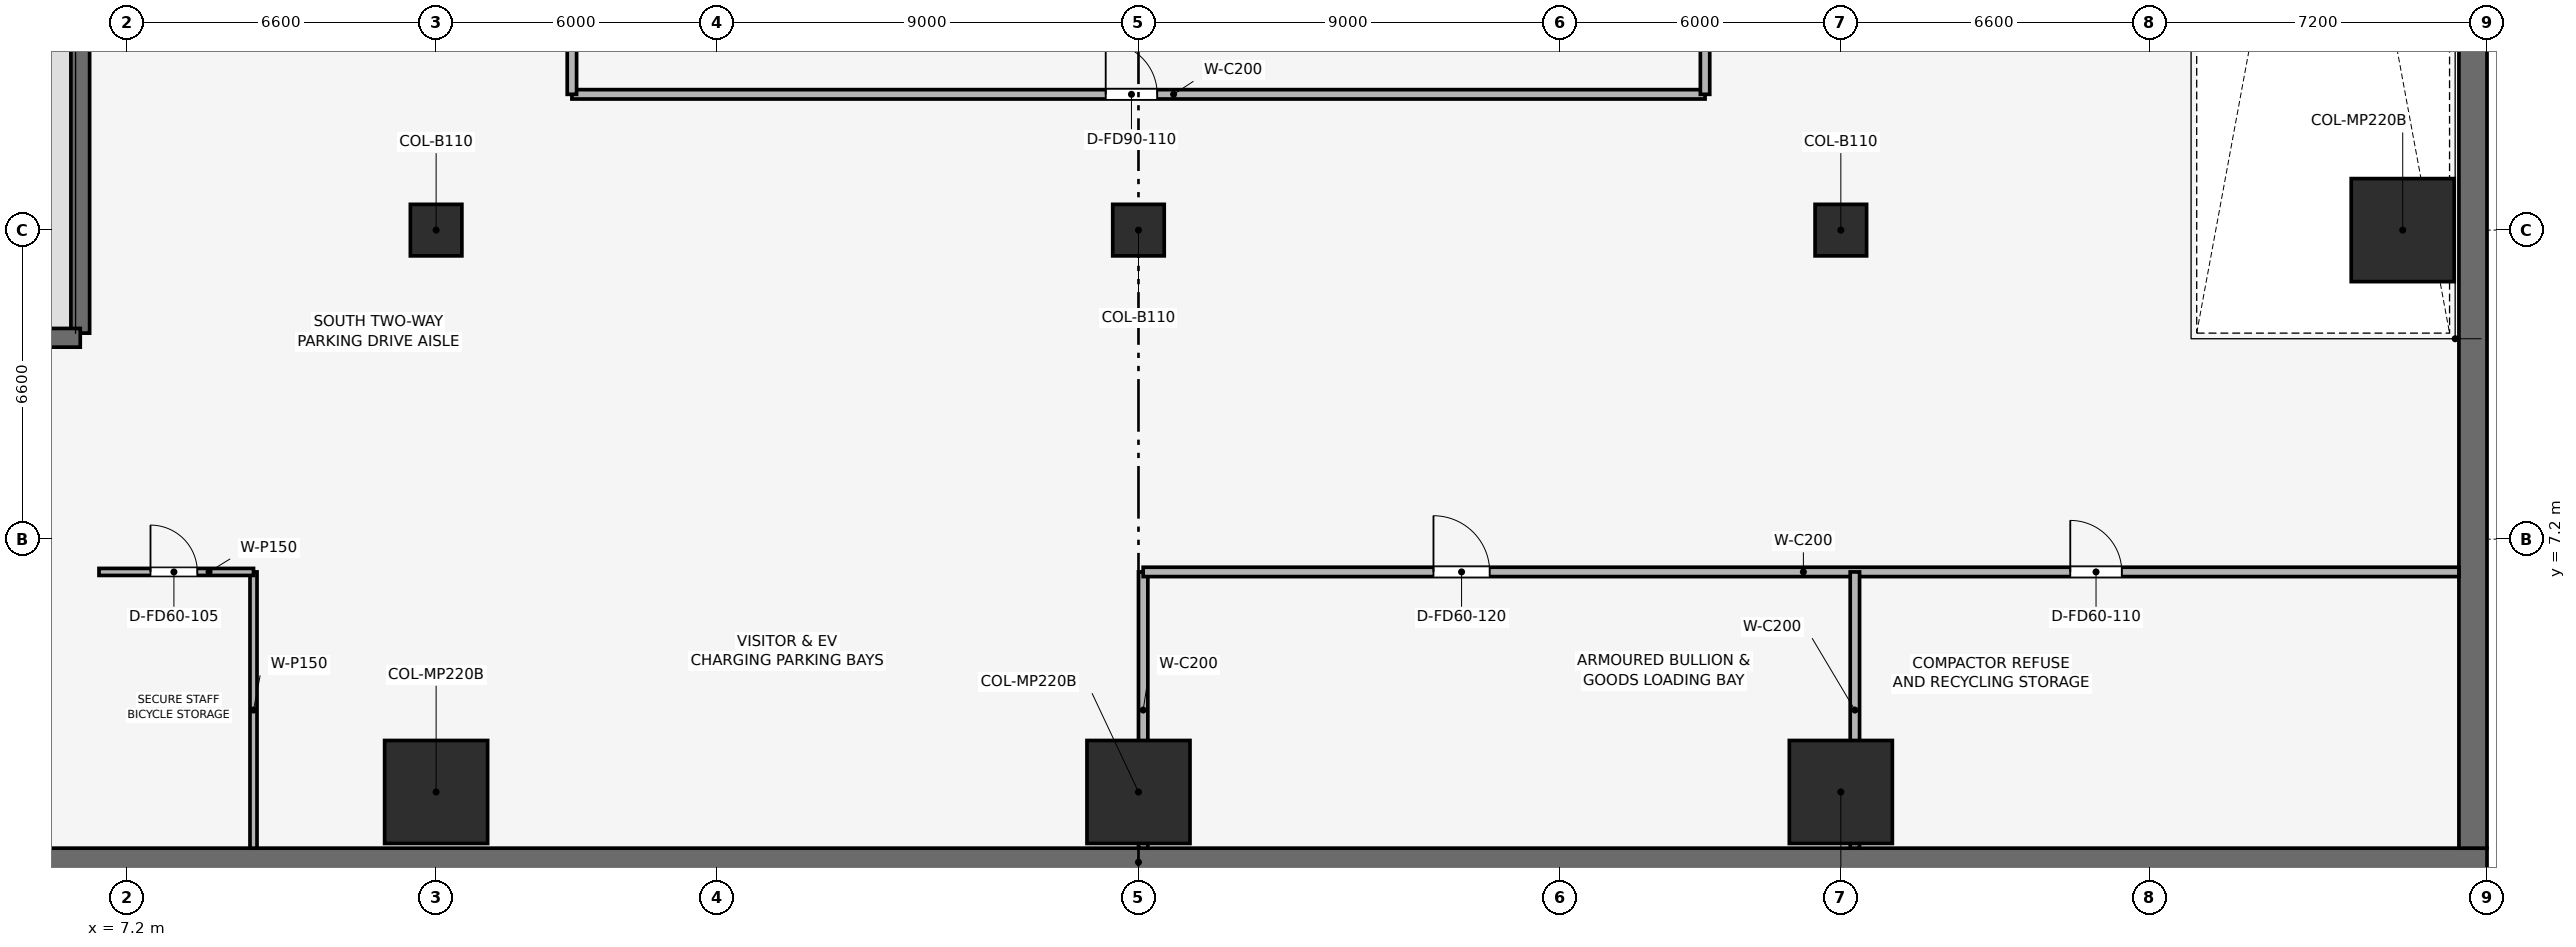
"""IFC4 building model, lengths in metres.
Left out: names, types, materials, properties, quantities, classifications, styles, units other than length and angle.
Written with IfcOpenShell. Run it as: python <this file> out.ifc"""

import sys

from ifc_helpers import new_model, si_unit, direction, frame, frame_2d, origin, origin_2d, place, context, subcontext, project, spatial, rectangle, extrude, element, fill, save


model = new_model("IFC4")
c1 = context("Model", 3, precision=1e-05, world=origin(), true_north=direction((0.0, 1.0)))
c2 = subcontext(c1, "Body", "Model", "MODEL_VIEW")
j1 = project(units=[si_unit("LENGTHUNIT", "METRE"), si_unit("PLANEANGLEUNIT", "RADIAN")], contexts=[c1])
p1 = place(None, origin())
s1 = spatial("IfcSite", under=j1, at=p1, CompositionType="ELEMENT")
p2 = place(p1, origin())
s2 = spatial("IfcBuilding", under=s1, at=p2, CompositionType="ELEMENT")
p3 = place(p2, frame((0.0, 0.0, -4.8)))
s3 = spatial("IfcBuildingStorey", under=s2, at=p3, CompositionType="ELEMENT", Elevation=-4.8)
p4 = place(p3, frame((0.0, 0.3, 0.0), z_axis=(0.0, 0.0, 1.0), x_axis=(1.0, 0.0, 0.0)))
e1 = element("IfcWall", 1, at=p4, inside=s3, PredefinedType="SOLIDWALL", context=c2, shape_type="SweptSolid", body=[
    extrude(rectangle(XDim=57.6, YDim=0.6, at=frame_2d((28.8, 0.0))), origin(), (0.0, 0.0, 1.0), 4.8),
])
p5 = place(p3, frame((57.3, 0.6, 0.0), z_axis=(0.0, 0.0, 1.0), x_axis=(0.0, 1.0, 0.0)))
e2 = element("IfcWall", 2, at=p5, inside=s3, PredefinedType="SOLIDWALL", context=c2, shape_type="SweptSolid", body=[
    extrude(rectangle(XDim=56.4, YDim=0.6, at=frame_2d((28.2, 0.0))), origin(), (0.0, 0.0, 1.0), 4.8),
])
for number, where, z_axis, x_axis in (
    (3, (13.8, 1.8, 0.002), (0.0, 0.0, 1.0), (1.0, 0.0, 0.0)),
    (4, (28.8, 1.8, 0.002), (0.0, 0.0, 1.0), (1.0, 0.0, 0.0)),
    (5, (43.8, 1.8, 0.002), (0.0, 0.0, 1.0), (1.0, 0.0, 0.0)),
    (6, (55.8, 13.8, 0.002), (0.0, 0.0, 1.0), (1.0, 0.0, 0.0)),
):
    element("IfcColumn", number, at=place(p3, frame(where, z_axis=z_axis, x_axis=x_axis)), inside=s3, PredefinedType="COLUMN", context=c2, shape_type="SweptSolid", body=[
        extrude(rectangle(XDim=2.2, YDim=2.2, at=origin_2d()), origin(), (0.0, 0.0, 1.0), 4.796),
    ])
for number, where, z_axis, x_axis in (
    (7, (13.8, 13.8, 0.002), (0.0, 0.0, 1.0), (1.0, 0.0, 0.0)),
    (8, (28.8, 13.8, 0.002), (0.0, 0.0, 1.0), (1.0, 0.0, 0.0)),
    (9, (43.8, 13.8, 0.002), (0.0, 0.0, 1.0), (1.0, 0.0, 0.0)),
):
    element("IfcColumn", number, at=place(p3, frame(where, z_axis=z_axis, x_axis=x_axis)), inside=s3, PredefinedType="COLUMN", context=c2, shape_type="SweptSolid", body=[
        extrude(rectangle(XDim=1.1, YDim=1.1, at=origin_2d()), origin(), (0.0, 0.0, 1.0), 4.796),
    ])
p6 = place(p3, frame((6.2, 11.6, 0.0), z_axis=(0.0, 0.0, 1.0), x_axis=(0.0, 1.0, 0.0)))
e10 = element("IfcWall", 10, at=p6, inside=s3, PredefinedType="SHEAR", context=c2, shape_type="SweptSolid", body=[
    extrude(rectangle(XDim=29.4, YDim=0.4, at=frame_2d((14.7, 0.0))), origin(), (0.0, 0.0, 1.0), 4.78),
])
p7 = place(p3, frame((0.8, 11.5, 0.0), z_axis=(0.0, 0.0, 1.0), x_axis=(1.0, 0.0, 0.0)))
e11 = element("IfcWall", 11, at=p7, inside=s3, PredefinedType="SHEAR", context=c2, shape_type="SweptSolid", body=[
    extrude(rectangle(XDim=5.4, YDim=0.4, at=frame_2d((2.7, 0.0))), origin(), (0.0, 0.0, 1.0), 4.78),
])
p8 = place(p3, frame((16.7, 16.7, 0.0), z_axis=(0.0, 0.0, 1.0), x_axis=(1.0, 0.0, 0.0)))
e12 = element("IfcWall", 12, at=p8, inside=s3, PredefinedType="PARTITIONING", context=c2, shape_type="SweptSolid", body=[
    extrude(rectangle(XDim=24.2, YDim=0.2, at=frame_2d((12.1, 0.0))), origin(), (0.0, 0.0, 1.0), 2.985),
])
p9 = place(p8, frame((11.4, 0.0, 0.0)))
e13 = element("IfcOpeningElement", 13, at=p9, cuts=e12, PredefinedType="OPENING", context=c2, shape_type="SweptSolid", body=[
    extrude(rectangle(XDim=1.1, YDim=2.15, at=frame_2d((0.55, 1.075))), frame((0.0, 0.11, 0.0), z_axis=(0.0, -1.0, 0.0), x_axis=(1.0, 0.0, 0.0)), (0.0, 0.0, 1.0), 0.22),
])
p10 = place(p3, frame((16.7, 16.7, 0.0), z_axis=(0.0, 0.0, 1.0), x_axis=(0.0, 1.0, 0.0)))
e14 = element("IfcWall", 14, at=p10, inside=s3, PredefinedType="PARTITIONING", context=c2, shape_type="SweptSolid", body=[
    extrude(rectangle(XDim=24.2, YDim=0.2, at=frame_2d((12.1, 0.0))), origin(), (0.0, 0.0, 1.0), 2.985),
])
p11 = place(p10, frame((11.4, 0.0, 0.0)))
e15 = element("IfcOpeningElement", 15, at=p11, cuts=e14, PredefinedType="OPENING", context=c2, shape_type="SweptSolid", body=[
    extrude(rectangle(XDim=1.1, YDim=2.15, at=frame_2d((0.55, 1.075))), frame((0.0, 0.11, 0.0), z_axis=(0.0, -1.0, 0.0), x_axis=(1.0, 0.0, 0.0)), (0.0, 0.0, 1.0), 0.22),
])
p12 = place(p3, frame((40.9, 16.7, 0.0), z_axis=(0.0, 0.0, 1.0), x_axis=(0.0, 1.0, 0.0)))
e16 = element("IfcWall", 16, at=p12, inside=s3, PredefinedType="PARTITIONING", context=c2, shape_type="SweptSolid", body=[
    extrude(rectangle(XDim=24.2, YDim=0.2, at=frame_2d((12.1, 0.0))), origin(), (0.0, 0.0, 1.0), 2.985),
])
p13 = place(p12, frame((11.4, 0.0, 0.0)))
e17 = element("IfcOpeningElement", 17, at=p13, cuts=e16, PredefinedType="OPENING", context=c2, shape_type="SweptSolid", body=[
    extrude(rectangle(XDim=1.1, YDim=2.15, at=frame_2d((0.55, 1.075))), frame((0.0, 0.11, 0.0), z_axis=(0.0, -1.0, 0.0), x_axis=(1.0, 0.0, 0.0)), (0.0, 0.0, 1.0), 0.22),
])
p14 = place(p3, frame((28.9, 0.6, 0.0), z_axis=(0.0, 0.0, 1.0), x_axis=(0.0, 1.0, 0.0)))
e18 = element("IfcWall", 18, at=p14, inside=s3, PredefinedType="PARTITIONING", context=c2, shape_type="SweptSolid", body=[
    extrude(rectangle(XDim=5.9, YDim=0.2, at=frame_2d((2.95, 0.0))), origin(), (0.0, 0.0, 1.0), 4.4),
])
p15 = place(p3, frame((28.9, 6.5, 0.0), z_axis=(0.0, 0.0, 1.0), x_axis=(1.0, 0.0, 0.0)))
e19 = element("IfcWall", 19, at=p15, inside=s3, PredefinedType="PARTITIONING", context=c2, shape_type="SweptSolid", body=[
    extrude(rectangle(XDim=28.1, YDim=0.2, at=frame_2d((14.05, 0.0))), origin(), (0.0, 0.0, 1.0), 4.4),
])
p16 = place(p15, frame((6.2, 0.0, 0.0)))
e20 = element("IfcOpeningElement", 20, at=p16, cuts=e19, PredefinedType="OPENING", context=c2, shape_type="SweptSolid", body=[
    extrude(rectangle(XDim=1.2, YDim=2.2, at=frame_2d((0.6, 1.1))), frame((0.0, 0.11, 0.0), z_axis=(0.0, -1.0, 0.0), x_axis=(1.0, 0.0, 0.0)), (0.0, 0.0, 1.0), 0.22),
])
p17 = place(p15, frame((19.8, 0.0, 0.0)))
e21 = element("IfcOpeningElement", 21, at=p17, cuts=e19, PredefinedType="OPENING", context=c2, shape_type="SweptSolid", body=[
    extrude(rectangle(XDim=1.1, YDim=2.15, at=frame_2d((0.55, 1.075))), frame((0.0, 0.11, 0.0), z_axis=(0.0, -1.0, 0.0), x_axis=(1.0, 0.0, 0.0)), (0.0, 0.0, 1.0), 0.22),
])
p18 = place(p3, frame((44.1, 0.6, 0.0), z_axis=(0.0, 0.0, 1.0), x_axis=(0.0, 1.0, 0.0)))
e22 = element("IfcWall", 22, at=p18, inside=s3, PredefinedType="PARTITIONING", context=c2, shape_type="SweptSolid", body=[
    extrude(rectangle(XDim=5.9, YDim=0.2, at=frame_2d((2.95, 0.0))), origin(), (0.0, 0.0, 1.0), 4.4),
])
p19 = place(p3, frame((9.9, 0.6, 0.0), z_axis=(0.0, 0.0, 1.0), x_axis=(0.0, 1.0, 0.0)))
e23 = element("IfcWall", 23, at=p19, inside=s3, PredefinedType="PARTITIONING", context=c2, shape_type="SweptSolid", body=[
    extrude(rectangle(XDim=5.9, YDim=0.15, at=frame_2d((2.95, 0.0))), origin(), (0.0, 0.0, 1.0), 4.4),
])
p20 = place(p3, frame((6.6, 6.5, 0.0), z_axis=(0.0, 0.0, 1.0), x_axis=(1.0, 0.0, 0.0)))
e24 = element("IfcWall", 24, at=p20, inside=s3, PredefinedType="PARTITIONING", context=c2, shape_type="SweptSolid", body=[
    extrude(rectangle(XDim=3.3, YDim=0.15, at=frame_2d((1.65, 0.0))), origin(), (0.0, 0.0, 1.0), 4.4),
])
p21 = place(p20, frame((1.1, 0.0, 0.0)))
e25 = element("IfcOpeningElement", 25, at=p21, cuts=e24, PredefinedType="OPENING", context=c2, shape_type="SweptSolid", body=[
    extrude(rectangle(XDim=1.0, YDim=2.15, at=frame_2d((0.5, 1.075))), frame((0.0, 0.085, 0.0), z_axis=(0.0, -1.0, 0.0), x_axis=(1.0, 0.0, 0.0)), (0.0, 0.0, 1.0), 0.17),
])
p22 = place(p9, origin())
e26 = element("IfcDoor", 26, at=p22, inside=s3, OperationType="SINGLE_SWING_LEFT", PredefinedType="DOOR", context=c2, shape_type="SweptSolid", body=[
    extrude(rectangle(XDim=1.1, YDim=2.15, at=frame_2d((0.55, 1.075))), frame((0.0, 0.025, 0.0), z_axis=(0.0, -1.0, 0.0), x_axis=(1.0, 0.0, 0.0)), (0.0, 0.0, 1.0), 0.05),
])
fill(e13, e26)
p23 = place(p16, origin())
e27 = element("IfcDoor", 27, at=p23, inside=s3, OperationType="SINGLE_SWING_LEFT", PredefinedType="DOOR", context=c2, shape_type="SweptSolid", body=[
    extrude(rectangle(XDim=1.2, YDim=2.2, at=frame_2d((0.6, 1.1))), frame((0.0, 0.025, 0.0), z_axis=(0.0, -1.0, 0.0), x_axis=(1.0, 0.0, 0.0)), (0.0, 0.0, 1.0), 0.05),
])
fill(e20, e27)
p24 = place(p17, origin())
e28 = element("IfcDoor", 28, at=p24, inside=s3, OperationType="SINGLE_SWING_LEFT", PredefinedType="DOOR", context=c2, shape_type="SweptSolid", body=[
    extrude(rectangle(XDim=1.1, YDim=2.15, at=frame_2d((0.55, 1.075))), frame((0.0, 0.025, 0.0), z_axis=(0.0, -1.0, 0.0), x_axis=(1.0, 0.0, 0.0)), (0.0, 0.0, 1.0), 0.05),
])
fill(e21, e28)
p25 = place(p21, origin())
e29 = element("IfcDoor", 29, at=p25, inside=s3, OperationType="SINGLE_SWING_LEFT", PredefinedType="DOOR", context=c2, shape_type="SweptSolid", body=[
    extrude(rectangle(XDim=1.0, YDim=2.15, at=frame_2d((0.5, 1.075))), frame((0.0, 0.025, 0.0), z_axis=(0.0, -1.0, 0.0), x_axis=(1.0, 0.0, 0.0)), (0.0, 0.0, 1.0), 0.05),
])
fill(e25, e29)
save(model, sys.argv[1])
